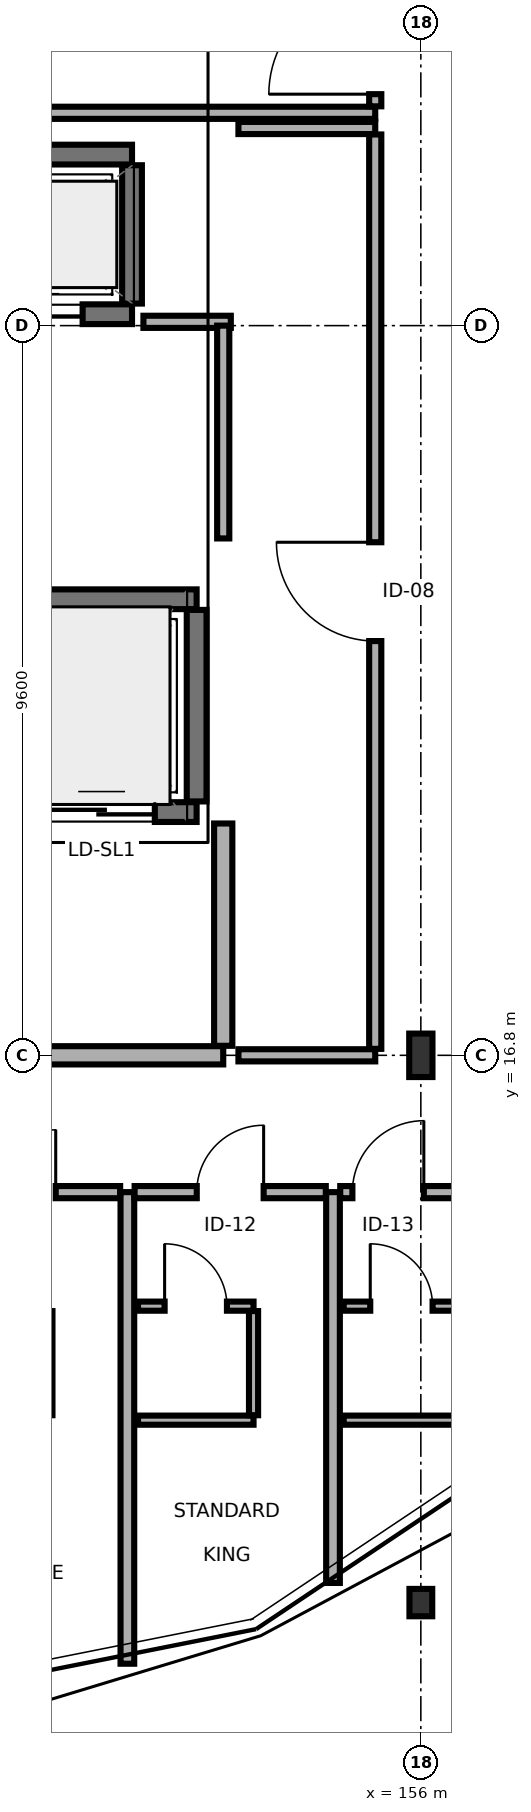
"""IFC4 building model, lengths in metres.
Left out: names, types, materials, properties, quantities, classifications, styles, units other than length and angle.
Written with IfcOpenShell. Run it as: python <this file> out.ifc"""

import sys

from ifc_helpers import new_model, si_unit, direction, frame, frame_2d, origin, origin_2d, place, context, subcontext, project, spatial, rectangle, i_section, extrude, element, fill, save


model = new_model("IFC4")
c1 = context("Model", 3, precision=1e-05, world=origin(), true_north=direction((0.0, 1.0)))
c2 = subcontext(c1, "Body", "Model", "MODEL_VIEW")
j1 = project(units=[si_unit("LENGTHUNIT", "METRE"), si_unit("PLANEANGLEUNIT", "RADIAN")], contexts=[c1])
p1 = place(None, origin())
s1 = spatial("IfcSite", under=j1, at=p1, CompositionType="ELEMENT")
p2 = place(p1, origin())
s2 = spatial("IfcBuilding", under=s1, at=p2, CompositionType="ELEMENT")
p3 = place(p2, frame((0.0, 0.0, 38.5)))
s3 = spatial("IfcBuildingStorey", under=s2, at=p3, CompositionType="ELEMENT", Elevation=38.5)
p4 = place(p3, frame((156.0, 16.8, 0.0), z_axis=(0.0, 0.0, 1.0), x_axis=(1.0, 0.0, 0.0)))
e1 = element("IfcColumn", 1, at=p4, inside=s3, PredefinedType="COLUMN", context=c2, shape_type="SweptSolid", body=[
    extrude(i_section(OverallWidth=0.306, OverallDepth=0.572, WebThickness=0.021, FlangeThickness=0.04, FilletRadius=0.027, at=origin_2d()), origin(), (0.0, 0.0, 1.0), 3.4),
])
p5 = place(p3, frame((156.0, 9.6, 0.0), z_axis=(0.0, 0.0, 1.0), x_axis=(1.0, 0.0, 0.0)))
e2 = element("IfcColumn", 2, at=p5, inside=s3, PredefinedType="COLUMN", context=c2, shape_type="SweptSolid", body=[
    extrude(i_section(OverallWidth=0.3, OverallDepth=0.36, WebThickness=0.012, FlangeThickness=0.022, FilletRadius=0.027, at=origin_2d()), origin(), (0.0, 0.0, 1.0), 3.4),
])
p6 = place(p3, frame((149.8, 26.55, 0.0), z_axis=(0.0, 0.0, 1.0), x_axis=(1.0, 0.0, 0.0)))
e3 = element("IfcWall", 3, at=p6, inside=s3, PredefinedType="SHEAR", context=c2, shape_type="SweptSolid", body=[
    extrude(rectangle(XDim=2.4, YDim=0.26, at=frame_2d((1.2, 0.0))), origin(), (0.0, 0.0, 1.0), 3.15),
])
p7 = place(p6, frame((0.65, 0.0, 0.0)))
e4 = element("IfcOpeningElement", 4, at=p7, cuts=e3, PredefinedType="OPENING", context=c2, shape_type="SweptSolid", body=[
    extrude(rectangle(XDim=1.1, YDim=2.2, at=frame_2d((0.55, 1.1))), frame((0.0, 0.14, 0.0), z_axis=(0.0, -1.0, 0.0), x_axis=(1.0, 0.0, 0.0)), (0.0, 0.0, 1.0), 0.28),
])
p8 = place(p3, frame((149.8, 28.65, 0.0), z_axis=(0.0, 0.0, 1.0), x_axis=(1.0, 0.0, 0.0)))
e5 = element("IfcWall", 5, at=p8, inside=s3, PredefinedType="SHEAR", context=c2, shape_type="SweptSolid", body=[
    extrude(rectangle(XDim=2.4, YDim=0.26, at=frame_2d((1.2, 0.0))), origin(), (0.0, 0.0, 1.0), 3.15),
])
p9 = place(p3, frame((152.2, 26.69, 0.0), z_axis=(0.0, 0.0, 1.0), x_axis=(0.0, 1.0, 0.0)))
e6 = element("IfcWall", 6, at=p9, inside=s3, PredefinedType="SHEAR", context=c2, shape_type="SweptSolid", body=[
    extrude(rectangle(XDim=1.82, YDim=0.26, at=frame_2d((0.91, 0.0))), origin(), (0.0, 0.0, 1.0), 3.15),
])
p10 = place(p3, frame((150.55, 20.0, 0.0), z_axis=(0.0, 0.0, 1.0), x_axis=(1.0, 0.0, 0.0)))
e7 = element("IfcWall", 7, at=p10, inside=s3, PredefinedType="SHEAR", context=c2, shape_type="SweptSolid", body=[
    extrude(rectangle(XDim=2.5, YDim=0.26, at=frame_2d((1.25, 0.0))), origin(), (0.0, 0.0, 1.0), 3.15),
])
p11 = place(p10, frame((0.55, 0.0, 0.0)))
e8 = element("IfcOpeningElement", 8, at=p11, cuts=e7, PredefinedType="OPENING", context=c2, shape_type="SweptSolid", body=[
    extrude(rectangle(XDim=1.4, YDim=2.3, at=frame_2d((0.7, 1.15))), frame((0.0, 0.14, 0.0), z_axis=(0.0, -1.0, 0.0), x_axis=(1.0, 0.0, 0.0)), (0.0, 0.0, 1.0), 0.28),
])
p12 = place(p3, frame((150.55, 22.8, 0.0), z_axis=(0.0, 0.0, 1.0), x_axis=(1.0, 0.0, 0.0)))
e9 = element("IfcWall", 9, at=p12, inside=s3, PredefinedType="SHEAR", context=c2, shape_type="SweptSolid", body=[
    extrude(rectangle(XDim=2.5, YDim=0.26, at=frame_2d((1.25, 0.0))), origin(), (0.0, 0.0, 1.0), 3.15),
])
p13 = place(p3, frame((153.05, 20.14, 0.0), z_axis=(0.0, 0.0, 1.0), x_axis=(0.0, 1.0, 0.0)))
e10 = element("IfcWall", 10, at=p13, inside=s3, PredefinedType="SHEAR", context=c2, shape_type="SweptSolid", body=[
    extrude(rectangle(XDim=2.52, YDim=0.26, at=frame_2d((1.26, 0.0))), origin(), (0.0, 0.0, 1.0), 3.15),
])
p14 = place(p3, frame((146.4, 16.8, 0.0), z_axis=(0.0, 0.0, 1.0), x_axis=(1.0, 0.0, 0.0)))
e11 = element("IfcWall", 11, at=p14, inside=s3, PredefinedType="SOLIDWALL", context=c2, shape_type="SweptSolid", body=[
    extrude(rectangle(XDim=7.0, YDim=0.24, at=frame_2d((3.5, 0.0))), origin(), (0.0, 0.0, 1.0), 2.685),
])
p15 = place(p14, frame((2.7, 0.0, 0.0)))
e12 = element("IfcOpeningElement", 12, at=p15, cuts=e11, PredefinedType="OPENING", context=c2, shape_type="SweptSolid", body=[
    extrude(rectangle(XDim=1.6, YDim=2.2, at=frame_2d((0.8, 1.1))), frame((0.0, 0.13, 0.0), z_axis=(0.0, -1.0, 0.0), x_axis=(1.0, 0.0, 0.0)), (0.0, 0.0, 1.0), 0.26),
])
p16 = place(p3, frame((153.4, 16.925, 0.0), z_axis=(0.0, 0.0, 1.0), x_axis=(0.0, 1.0, 0.0)))
e13 = element("IfcWall", 13, at=p16, inside=s3, PredefinedType="SOLIDWALL", context=c2, shape_type="SweptSolid", body=[
    extrude(rectangle(XDim=2.925, YDim=0.24, at=frame_2d((1.462, 0.0))), origin(), (0.0, 0.0, 1.0), 2.685),
])
p17 = place(p3, frame((146.4, 29.2, 0.0), z_axis=(0.0, 0.0, 1.0), x_axis=(1.0, 0.0, 0.0)))
e14 = element("IfcWall", 14, at=p17, inside=s3, PredefinedType="PARTITIONING", context=c2, shape_type="SweptSolid", body=[
    extrude(rectangle(XDim=9.0, YDim=0.16, at=frame_2d((4.5, 0.0))), origin(), (0.0, 0.0, 1.0), 3.15),
])
p18 = place(p3, frame((155.4, 29.285, 0.0), z_axis=(0.0, 0.0, 1.0), x_axis=(0.0, 1.0, 0.0)))
e15 = element("IfcWall", 15, at=p18, inside=s3, PredefinedType="PARTITIONING", context=c2, shape_type="SweptSolid", body=[
    extrude(rectangle(XDim=9.03, YDim=0.16, at=frame_2d((4.515, 0.0))), origin(), (0.0, 0.0, 1.0), 3.15),
])
p19 = place(p18, frame((0.16, 0.0, 0.0)))
e16 = element("IfcOpeningElement", 16, at=p19, cuts=e15, PredefinedType="OPENING", context=c2, shape_type="SweptSolid", body=[
    extrude(rectangle(XDim=1.4, YDim=2.2, at=frame_2d((0.7, 1.1))), frame((0.0, 0.09, 0.0), z_axis=(0.0, -1.0, 0.0), x_axis=(1.0, 0.0, 0.0)), (0.0, 0.0, 1.0), 0.18),
])
p20 = place(p3, frame((153.6, 16.8, 0.0), z_axis=(0.0, 0.0, 1.0), x_axis=(1.0, 0.0, 0.0)))
e17 = element("IfcWall", 17, at=p20, inside=s3, PredefinedType="PARTITIONING", context=c2, shape_type="SweptSolid", body=[
    extrude(rectangle(XDim=1.8, YDim=0.16, at=frame_2d((0.9, 0.0))), origin(), (0.0, 0.0, 1.0), 2.685),
])
p21 = place(p3, frame((153.6, 29.0, 0.0), z_axis=(0.0, 0.0, 1.0), x_axis=(1.0, 0.0, 0.0)))
e18 = element("IfcWall", 18, at=p21, inside=s3, PredefinedType="PARTITIONING", context=c2, shape_type="SweptSolid", body=[
    extrude(rectangle(XDim=1.8, YDim=0.16, at=frame_2d((0.9, 0.0))), origin(), (0.0, 0.0, 1.0), 3.15),
])
p22 = place(p3, frame((155.4, 16.885, 0.0), z_axis=(0.0, 0.0, 1.0), x_axis=(0.0, 1.0, 0.0)))
e19 = element("IfcWall", 19, at=p22, inside=s3, PredefinedType="PARTITIONING", context=c2, shape_type="SweptSolid", body=[
    extrude(rectangle(XDim=12.03, YDim=0.16, at=frame_2d((6.015, 0.0))), origin(), (0.0, 0.0, 1.0), 2.685),
])
p23 = place(p22, frame((5.365, 0.0, 0.0)))
e20 = element("IfcOpeningElement", 20, at=p23, cuts=e19, PredefinedType="OPENING", context=c2, shape_type="SweptSolid", body=[
    extrude(rectangle(XDim=1.3, YDim=2.2, at=frame_2d((0.65, 1.1))), frame((0.0, 0.09, 0.0), z_axis=(0.0, -1.0, 0.0), x_axis=(1.0, 0.0, 0.0)), (0.0, 0.0, 1.0), 0.18),
])
p24 = place(p3, frame((152.35, 26.45, 0.0), z_axis=(0.0, 0.0, 1.0), x_axis=(1.0, 0.0, 0.0)))
e21 = element("IfcWall", 21, at=p24, inside=s3, PredefinedType="PARTITIONING", context=c2, shape_type="SweptSolid", body=[
    extrude(rectangle(XDim=1.15, YDim=0.16, at=frame_2d((0.575, 0.0))), origin(), (0.0, 0.0, 1.0), 3.15),
])
p25 = place(p3, frame((153.4, 23.6, 0.0), z_axis=(0.0, 0.0, 1.0), x_axis=(0.0, 1.0, 0.0)))
e22 = element("IfcWall", 22, at=p25, inside=s3, PredefinedType="PARTITIONING", context=c2, shape_type="SweptSolid", body=[
    extrude(rectangle(XDim=2.8, YDim=0.16, at=frame_2d((1.4, 0.0))), origin(), (0.0, 0.0, 1.0), 3.15),
])
p26 = place(p3, frame((149.528, 15.0, 0.0), z_axis=(0.0, 0.0, 1.0), x_axis=(1.0, 0.0, 0.0)))
e23 = element("IfcWall", 23, at=p26, inside=s3, PredefinedType="PARTITIONING", context=c2, shape_type="SweptSolid", body=[
    extrude(rectangle(XDim=2.516, YDim=0.16, at=frame_2d((1.258, 0.0))), origin(), (0.0, 0.0, 1.0), 3.15),
])
p27 = place(p26, frame((0.848, 0.0, 0.0)))
e24 = element("IfcOpeningElement", 24, at=p27, cuts=e23, PredefinedType="OPENING", context=c2, shape_type="SweptSolid", body=[
    extrude(rectangle(XDim=0.82, YDim=2.08, at=frame_2d((0.41, 1.04))), frame((0.0, 0.09, 0.0), z_axis=(0.0, -1.0, 0.0), x_axis=(1.0, 0.0, 0.0)), (0.0, 0.0, 1.0), 0.18),
])
p28 = place(p3, frame((151.093, 12.065, 0.0), z_axis=(0.0, 0.0, 1.0), x_axis=(0.0, 1.0, 0.0)))
e25 = element("IfcWall", 25, at=p28, inside=s3, PredefinedType="PARTITIONING", context=c2, shape_type="SweptSolid", body=[
    extrude(rectangle(XDim=1.37, YDim=0.12, at=frame_2d((0.685, 0.0))), origin(), (0.0, 0.0, 1.0), 3.15),
])
p29 = place(p3, frame((152.139, 8.796, 0.0), z_axis=(0.0, 0.0, 1.0), x_axis=(0.0, 1.0, 0.0)))
e26 = element("IfcWall", 26, at=p29, inside=s3, PredefinedType="PARTITIONING", context=c2, shape_type="SweptSolid", body=[
    extrude(rectangle(XDim=6.204, YDim=0.18, at=frame_2d((3.102, 0.0))), origin(), (0.0, 0.0, 1.0), 2.695),
])
p30 = place(p3, frame((152.234, 15.0, 0.0), z_axis=(0.0, 0.0, 1.0), x_axis=(1.0, 0.0, 0.0)))
e27 = element("IfcWall", 27, at=p30, inside=s3, PredefinedType="PARTITIONING", context=c2, shape_type="SweptSolid", body=[
    extrude(rectangle(XDim=2.516, YDim=0.16, at=frame_2d((1.258, 0.0))), origin(), (0.0, 0.0, 1.0), 3.15),
])
p31 = place(p30, frame((0.818, 0.0, 0.0)))
e28 = element("IfcOpeningElement", 28, at=p31, cuts=e27, PredefinedType="OPENING", context=c2, shape_type="SweptSolid", body=[
    extrude(rectangle(XDim=0.88, YDim=2.12, at=frame_2d((0.44, 1.06))), frame((0.0, 0.09, 0.0), z_axis=(0.0, -1.0, 0.0), x_axis=(1.0, 0.0, 0.0)), (0.0, 0.0, 1.0), 0.18),
])
p32 = place(p3, frame((152.279, 12.0, 0.0), z_axis=(0.0, 0.0, 1.0), x_axis=(1.0, 0.0, 0.0)))
e29 = element("IfcWall", 29, at=p32, inside=s3, PredefinedType="PARTITIONING", context=c2, shape_type="SweptSolid", body=[
    extrude(rectangle(XDim=1.52, YDim=0.12, at=frame_2d((0.76, 0.0))), origin(), (0.0, 0.0, 1.0), 3.15),
])
p33 = place(p3, frame((152.279, 13.5, 0.0), z_axis=(0.0, 0.0, 1.0), x_axis=(1.0, 0.0, 0.0)))
e30 = element("IfcWall", 30, at=p33, inside=s3, PredefinedType="PARTITIONING", context=c2, shape_type="SweptSolid", body=[
    extrude(rectangle(XDim=1.52, YDim=0.12, at=frame_2d((0.76, 0.0))), origin(), (0.0, 0.0, 1.0), 3.15),
])
p34 = place(p33, frame((0.35, 0.0, 0.0)))
e31 = element("IfcOpeningElement", 31, at=p34, cuts=e30, PredefinedType="OPENING", context=c2, shape_type="SweptSolid", body=[
    extrude(rectangle(XDim=0.82, YDim=2.08, at=frame_2d((0.41, 1.04))), frame((0.0, 0.07, 0.0), z_axis=(0.0, -1.0, 0.0), x_axis=(1.0, 0.0, 0.0)), (0.0, 0.0, 1.0), 0.14),
])
p35 = place(p3, frame((153.799, 12.065, 0.0), z_axis=(0.0, 0.0, 1.0), x_axis=(0.0, 1.0, 0.0)))
e32 = element("IfcWall", 32, at=p35, inside=s3, PredefinedType="PARTITIONING", context=c2, shape_type="SweptSolid", body=[
    extrude(rectangle(XDim=1.37, YDim=0.12, at=frame_2d((0.685, 0.0))), origin(), (0.0, 0.0, 1.0), 3.15),
])
p36 = place(p3, frame((154.844, 9.858, 0.0), z_axis=(0.0, 0.0, 1.0), x_axis=(0.0, 1.0, 0.0)))
e33 = element("IfcWall", 33, at=p36, inside=s3, PredefinedType="PARTITIONING", context=c2, shape_type="SweptSolid", body=[
    extrude(rectangle(XDim=5.142, YDim=0.18, at=frame_2d((2.571, 0.0))), origin(), (0.0, 0.0, 1.0), 3.15),
])
p37 = place(p3, frame((154.939, 15.0, 0.0), z_axis=(0.0, 0.0, 1.0), x_axis=(1.0, 0.0, 0.0)))
e34 = element("IfcWall", 34, at=p37, inside=s3, PredefinedType="PARTITIONING", context=c2, shape_type="SweptSolid", body=[
    extrude(rectangle(XDim=2.516, YDim=0.16, at=frame_2d((1.258, 0.0))), origin(), (0.0, 0.0, 1.0), 2.735),
])
p38 = place(p37, frame((0.16, 0.0, 0.0)))
e35 = element("IfcOpeningElement", 35, at=p38, cuts=e34, PredefinedType="OPENING", context=c2, shape_type="SweptSolid", body=[
    extrude(rectangle(XDim=0.94, YDim=2.14, at=frame_2d((0.47, 1.07))), frame((0.0, 0.09, 0.0), z_axis=(0.0, -1.0, 0.0), x_axis=(1.0, 0.0, 0.0)), (0.0, 0.0, 1.0), 0.18),
])
p39 = place(p3, frame((154.984, 12.0, 0.0), z_axis=(0.0, 0.0, 1.0), x_axis=(1.0, 0.0, 0.0)))
e36 = element("IfcWall", 36, at=p39, inside=s3, PredefinedType="PARTITIONING", context=c2, shape_type="SweptSolid", body=[
    extrude(rectangle(XDim=1.52, YDim=0.12, at=frame_2d((0.76, 0.0))), origin(), (0.0, 0.0, 1.0), 2.735),
])
p40 = place(p3, frame((154.984, 13.5, 0.0), z_axis=(0.0, 0.0, 1.0), x_axis=(1.0, 0.0, 0.0)))
e37 = element("IfcWall", 37, at=p40, inside=s3, PredefinedType="PARTITIONING", context=c2, shape_type="SweptSolid", body=[
    extrude(rectangle(XDim=1.52, YDim=0.12, at=frame_2d((0.76, 0.0))), origin(), (0.0, 0.0, 1.0), 2.735),
])
p41 = place(p40, frame((0.35, 0.0, 0.0)))
e38 = element("IfcOpeningElement", 38, at=p41, cuts=e37, PredefinedType="OPENING", context=c2, shape_type="SweptSolid", body=[
    extrude(rectangle(XDim=0.82, YDim=2.08, at=frame_2d((0.41, 1.04))), frame((0.0, 0.07, 0.0), z_axis=(0.0, -1.0, 0.0), x_axis=(1.0, 0.0, 0.0)), (0.0, 0.0, 1.0), 0.14),
])
p42 = place(p7, origin())
e39 = element("IfcDoor", 39, at=p42, inside=s3, OperationType="SLIDING_TO_LEFT", PredefinedType="DOOR", context=c2, shape_type="SweptSolid", body=[
    extrude(rectangle(XDim=1.1, YDim=2.2, at=frame_2d((0.55, 1.1))), frame((0.0, 0.025, 0.0), z_axis=(0.0, -1.0, 0.0), x_axis=(1.0, 0.0, 0.0)), (0.0, 0.0, 1.0), 0.05),
])
fill(e4, e39)
p43 = place(p11, origin())
e40 = element("IfcDoor", 40, at=p43, inside=s3, OperationType="SLIDING_TO_LEFT", PredefinedType="DOOR", context=c2, shape_type="SweptSolid", body=[
    extrude(rectangle(XDim=1.4, YDim=2.3, at=frame_2d((0.7, 1.15))), frame((0.0, 0.025, 0.0), z_axis=(0.0, -1.0, 0.0), x_axis=(1.0, 0.0, 0.0)), (0.0, 0.0, 1.0), 0.05),
])
fill(e8, e40)
p44 = place(p19, origin())
e41 = element("IfcDoor", 41, at=p44, inside=s3, OperationType="SINGLE_SWING_LEFT", PredefinedType="DOOR", context=c2, shape_type="SweptSolid", body=[
    extrude(rectangle(XDim=1.4, YDim=2.2, at=frame_2d((0.7, 1.1))), frame((0.0, 0.025, 0.0), z_axis=(0.0, -1.0, 0.0), x_axis=(1.0, 0.0, 0.0)), (0.0, 0.0, 1.0), 0.05),
])
fill(e16, e41)
p45 = place(p23, origin())
e42 = element("IfcDoor", 42, at=p45, inside=s3, OperationType="SINGLE_SWING_RIGHT", PredefinedType="DOOR", context=c2, shape_type="SweptSolid", body=[
    extrude(rectangle(XDim=1.3, YDim=2.2, at=frame_2d((0.65, 1.1))), frame((0.0, 0.025, 0.0), z_axis=(0.0, -1.0, 0.0), x_axis=(1.0, 0.0, 0.0)), (0.0, 0.0, 1.0), 0.05),
])
fill(e20, e42)
p46 = place(p27, origin())
e43 = element("IfcDoor", 43, at=p46, inside=s3, OperationType="SINGLE_SWING_RIGHT", PredefinedType="DOOR", context=c2, shape_type="SweptSolid", body=[
    extrude(rectangle(XDim=0.82, YDim=2.08, at=frame_2d((0.41, 1.04))), frame((0.0, 0.025, 0.0), z_axis=(0.0, -1.0, 0.0), x_axis=(1.0, 0.0, 0.0)), (0.0, 0.0, 1.0), 0.05),
])
fill(e24, e43)
p47 = place(p31, origin())
e44 = element("IfcDoor", 44, at=p47, inside=s3, OperationType="SINGLE_SWING_RIGHT", PredefinedType="DOOR", context=c2, shape_type="SweptSolid", body=[
    extrude(rectangle(XDim=0.88, YDim=2.12, at=frame_2d((0.44, 1.06))), frame((0.0, 0.025, 0.0), z_axis=(0.0, -1.0, 0.0), x_axis=(1.0, 0.0, 0.0)), (0.0, 0.0, 1.0), 0.05),
])
fill(e28, e44)
p48 = place(p34, origin())
e45 = element("IfcDoor", 45, at=p48, inside=s3, OperationType="SINGLE_SWING_LEFT", PredefinedType="DOOR", context=c2, shape_type="SweptSolid", body=[
    extrude(rectangle(XDim=0.82, YDim=2.08, at=frame_2d((0.41, 1.04))), frame((0.0, 0.025, 0.0), z_axis=(0.0, -1.0, 0.0), x_axis=(1.0, 0.0, 0.0)), (0.0, 0.0, 1.0), 0.05),
])
fill(e31, e45)
p49 = place(p38, origin())
e46 = element("IfcDoor", 46, at=p49, inside=s3, OperationType="SINGLE_SWING_RIGHT", PredefinedType="DOOR", context=c2, shape_type="SweptSolid", body=[
    extrude(rectangle(XDim=0.94, YDim=2.14, at=frame_2d((0.47, 1.07))), frame((0.0, 0.025, 0.0), z_axis=(0.0, -1.0, 0.0), x_axis=(1.0, 0.0, 0.0)), (0.0, 0.0, 1.0), 0.05),
])
fill(e35, e46)
p50 = place(p41, origin())
e47 = element("IfcDoor", 47, at=p50, inside=s3, OperationType="SINGLE_SWING_LEFT", PredefinedType="DOOR", context=c2, shape_type="SweptSolid", body=[
    extrude(rectangle(XDim=0.82, YDim=2.08, at=frame_2d((0.41, 1.04))), frame((0.0, 0.025, 0.0), z_axis=(0.0, -1.0, 0.0), x_axis=(1.0, 0.0, 0.0)), (0.0, 0.0, 1.0), 0.05),
])
fill(e38, e47)
save(model, sys.argv[1])
